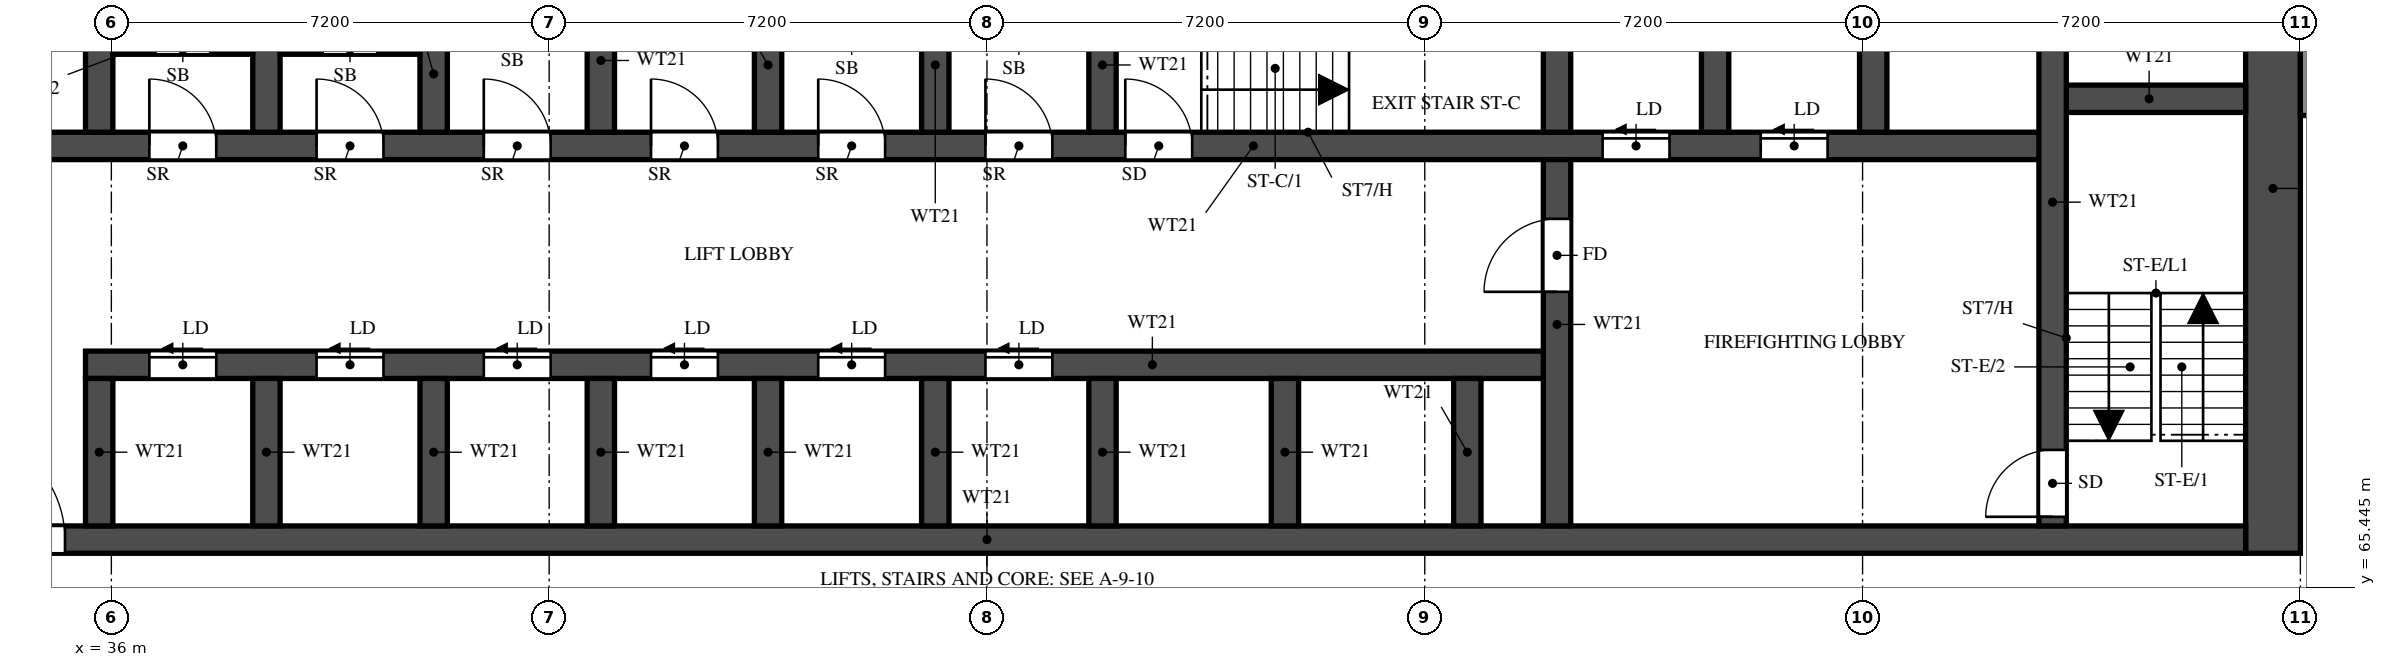
"""IFC4 building model, lengths in metres.
Left out: names, types, materials, properties, quantities, classifications, styles, units other than length and angle.
Written with IfcOpenShell. Run it as: python <this file> out.ifc"""

import sys

from ifc_helpers import new_model, si_unit, direction, frame, frame_2d, origin, place, context, subcontext, project, spatial, rectangle, extrude, element, fill, save


model = new_model("IFC4")
c1 = context("Model", 3, precision=1e-05, world=origin(), true_north=direction((0.0, 1.0)))
c2 = subcontext(c1, "Body", "Model", "MODEL_VIEW")
j1 = project(units=[si_unit("LENGTHUNIT", "METRE"), si_unit("PLANEANGLEUNIT", "RADIAN")], contexts=[c1])
p1 = place(None, origin())
s1 = spatial("IfcSite", under=j1, at=p1, CompositionType="ELEMENT")
p2 = place(p1, origin())
s2 = spatial("IfcBuilding", under=s1, at=p2, CompositionType="ELEMENT")
p3 = place(p2, frame((0.0, 0.0, 51.5)))
s3 = spatial("IfcBuildingStorey", under=s2, at=p3, CompositionType="ELEMENT", Elevation=51.5)
p4 = place(p3, frame((71.55, 66.0, 0.0), z_axis=(0.0, 0.0, 1.0), x_axis=(0.0, 1.0, 0.0)))
e1 = element("IfcWall", 1, at=p4, inside=s3, PredefinedType="SHEAR", context=c2, shape_type="SweptSolid", body=[
    extrude(rectangle(XDim=12.0, YDim=0.9, at=frame_2d((6.0, 0.0))), origin(), (0.0, 0.0, 1.0), 3.18),
])
p5 = place(p3, frame((29.7, 66.225, 0.0), z_axis=(0.0, 0.0, 1.0), x_axis=(1.0, 0.0, 0.0)))
e2 = element("IfcWall", 2, at=p5, inside=s3, PredefinedType="SHEAR", context=c2, shape_type="SweptSolid", body=[
    extrude(rectangle(XDim=41.4, YDim=0.45, at=frame_2d((20.7, 0.0))), origin(), (0.0, 0.0, 1.0), 3.18),
])
p6 = place(p5, frame((0.925, 0.0, 0.0)))
e3 = element("IfcOpeningElement", 3, at=p6, cuts=e2, PredefinedType="OPENING", context=c2, shape_type="SweptSolid", body=[
    extrude(rectangle(XDim=1.1, YDim=2.1, at=frame_2d((0.55, 1.05))), frame((0.0, 0.235, 0.0), z_axis=(0.0, -1.0, 0.0), x_axis=(1.0, 0.0, 0.0)), (0.0, 0.0, 1.0), 0.47),
])
p7 = place(p5, frame((3.738, 0.0, 0.0)))
e4 = element("IfcOpeningElement", 4, at=p7, cuts=e2, PredefinedType="OPENING", context=c2, shape_type="SweptSolid", body=[
    extrude(rectangle(XDim=1.8, YDim=2.1, at=frame_2d((0.9, 1.05))), frame((0.0, 0.235, 0.0), z_axis=(0.0, -1.0, 0.0), x_axis=(1.0, 0.0, 0.0)), (0.0, 0.0, 1.0), 0.47),
])
p8 = place(p3, frame((35.575, 69.1, 0.0), z_axis=(0.0, 0.0, 1.0), x_axis=(1.0, 0.0, 0.0)))
e5 = element("IfcWall", 5, at=p8, inside=s3, PredefinedType="SHEAR", context=c2, shape_type="SweptSolid", body=[
    extrude(rectangle(XDim=24.2, YDim=0.45, at=frame_2d((12.1, 0.0))), origin(), (0.0, 0.0, 1.0), 3.18),
])
p9 = place(p8, frame((1.05, 0.0, 0.0)))
e6 = element("IfcOpeningElement", 6, at=p9, cuts=e5, PredefinedType="OPENING", context=c2, shape_type="SweptSolid", body=[
    extrude(rectangle(XDim=1.1, YDim=2.1, at=frame_2d((0.55, 1.05))), frame((0.0, 0.235, 0.0), z_axis=(0.0, -1.0, 0.0), x_axis=(1.0, 0.0, 0.0)), (0.0, 0.0, 1.0), 0.47),
])
p10 = place(p8, frame((3.8, 0.0, 0.0)))
e7 = element("IfcOpeningElement", 7, at=p10, cuts=e5, PredefinedType="OPENING", context=c2, shape_type="SweptSolid", body=[
    extrude(rectangle(XDim=1.1, YDim=2.1, at=frame_2d((0.55, 1.05))), frame((0.0, 0.235, 0.0), z_axis=(0.0, -1.0, 0.0), x_axis=(1.0, 0.0, 0.0)), (0.0, 0.0, 1.0), 0.47),
])
p11 = place(p8, frame((6.55, 0.0, 0.0)))
e8 = element("IfcOpeningElement", 8, at=p11, cuts=e5, PredefinedType="OPENING", context=c2, shape_type="SweptSolid", body=[
    extrude(rectangle(XDim=1.1, YDim=2.1, at=frame_2d((0.55, 1.05))), frame((0.0, 0.235, 0.0), z_axis=(0.0, -1.0, 0.0), x_axis=(1.0, 0.0, 0.0)), (0.0, 0.0, 1.0), 0.47),
])
p12 = place(p8, frame((9.3, 0.0, 0.0)))
e9 = element("IfcOpeningElement", 9, at=p12, cuts=e5, PredefinedType="OPENING", context=c2, shape_type="SweptSolid", body=[
    extrude(rectangle(XDim=1.1, YDim=2.1, at=frame_2d((0.55, 1.05))), frame((0.0, 0.235, 0.0), z_axis=(0.0, -1.0, 0.0), x_axis=(1.0, 0.0, 0.0)), (0.0, 0.0, 1.0), 0.47),
])
p13 = place(p8, frame((12.05, 0.0, 0.0)))
e10 = element("IfcOpeningElement", 10, at=p13, cuts=e5, PredefinedType="OPENING", context=c2, shape_type="SweptSolid", body=[
    extrude(rectangle(XDim=1.1, YDim=2.1, at=frame_2d((0.55, 1.05))), frame((0.0, 0.235, 0.0), z_axis=(0.0, -1.0, 0.0), x_axis=(1.0, 0.0, 0.0)), (0.0, 0.0, 1.0), 0.47),
])
p14 = place(p8, frame((14.8, 0.0, 0.0)))
e11 = element("IfcOpeningElement", 11, at=p14, cuts=e5, PredefinedType="OPENING", context=c2, shape_type="SweptSolid", body=[
    extrude(rectangle(XDim=1.1, YDim=2.1, at=frame_2d((0.55, 1.05))), frame((0.0, 0.235, 0.0), z_axis=(0.0, -1.0, 0.0), x_axis=(1.0, 0.0, 0.0)), (0.0, 0.0, 1.0), 0.47),
])
p15 = place(p3, frame((32.875, 72.7, 0.0), z_axis=(0.0, 0.0, 1.0), x_axis=(1.0, 0.0, 0.0)))
e12 = element("IfcWall", 12, at=p15, inside=s3, PredefinedType="SHEAR", context=c2, shape_type="SweptSolid", body=[
    extrude(rectangle(XDim=35.05, YDim=0.45, at=frame_2d((17.525, 0.0))), origin(), (0.0, 0.0, 1.0), 3.18),
])
p16 = place(p15, frame((19.8, 0.0, 0.0)))
e13 = element("IfcOpeningElement", 13, at=p16, cuts=e12, PredefinedType="OPENING", context=c2, shape_type="SweptSolid", body=[
    extrude(rectangle(XDim=1.1, YDim=2.1, at=frame_2d((0.55, 1.05))), frame((0.0, 0.235, 0.0), z_axis=(0.0, -1.0, 0.0), x_axis=(1.0, 0.0, 0.0)), (0.0, 0.0, 1.0), 0.47),
])
p17 = place(p15, frame((27.65, 0.0, 0.0)))
e14 = element("IfcOpeningElement", 14, at=p17, cuts=e12, PredefinedType="OPENING", context=c2, shape_type="SweptSolid", body=[
    extrude(rectangle(XDim=1.1, YDim=2.1, at=frame_2d((0.55, 1.05))), frame((0.0, 0.235, 0.0), z_axis=(0.0, -1.0, 0.0), x_axis=(1.0, 0.0, 0.0)), (0.0, 0.0, 1.0), 0.47),
])
p18 = place(p15, frame((30.25, 0.0, 0.0)))
e15 = element("IfcOpeningElement", 15, at=p18, cuts=e12, PredefinedType="OPENING", context=c2, shape_type="SweptSolid", body=[
    extrude(rectangle(XDim=1.1, YDim=2.1, at=frame_2d((0.55, 1.05))), frame((0.0, 0.235, 0.0), z_axis=(0.0, -1.0, 0.0), x_axis=(1.0, 0.0, 0.0)), (0.0, 0.0, 1.0), 0.47),
])
p19 = place(p15, frame((3.75, 0.0, 0.0)))
e16 = element("IfcOpeningElement", 16, at=p19, cuts=e12, PredefinedType="OPENING", context=c2, shape_type="SweptSolid", body=[
    extrude(rectangle(XDim=1.1, YDim=2.1, at=frame_2d((0.55, 1.05))), frame((0.0, 0.235, 0.0), z_axis=(0.0, -1.0, 0.0), x_axis=(1.0, 0.0, 0.0)), (0.0, 0.0, 1.0), 0.47),
])
p20 = place(p15, frame((6.5, 0.0, 0.0)))
e17 = element("IfcOpeningElement", 17, at=p20, cuts=e12, PredefinedType="OPENING", context=c2, shape_type="SweptSolid", body=[
    extrude(rectangle(XDim=1.1, YDim=2.1, at=frame_2d((0.55, 1.05))), frame((0.0, 0.235, 0.0), z_axis=(0.0, -1.0, 0.0), x_axis=(1.0, 0.0, 0.0)), (0.0, 0.0, 1.0), 0.47),
])
p21 = place(p15, frame((9.25, 0.0, 0.0)))
e18 = element("IfcOpeningElement", 18, at=p21, cuts=e12, PredefinedType="OPENING", context=c2, shape_type="SweptSolid", body=[
    extrude(rectangle(XDim=1.1, YDim=2.1, at=frame_2d((0.55, 1.05))), frame((0.0, 0.235, 0.0), z_axis=(0.0, -1.0, 0.0), x_axis=(1.0, 0.0, 0.0)), (0.0, 0.0, 1.0), 0.47),
])
p22 = place(p15, frame((12.0, 0.0, 0.0)))
e19 = element("IfcOpeningElement", 19, at=p22, cuts=e12, PredefinedType="OPENING", context=c2, shape_type="SweptSolid", body=[
    extrude(rectangle(XDim=1.1, YDim=2.1, at=frame_2d((0.55, 1.05))), frame((0.0, 0.235, 0.0), z_axis=(0.0, -1.0, 0.0), x_axis=(1.0, 0.0, 0.0)), (0.0, 0.0, 1.0), 0.47),
])
p23 = place(p15, frame((14.75, 0.0, 0.0)))
e20 = element("IfcOpeningElement", 20, at=p23, cuts=e12, PredefinedType="OPENING", context=c2, shape_type="SweptSolid", body=[
    extrude(rectangle(XDim=1.1, YDim=2.1, at=frame_2d((0.55, 1.05))), frame((0.0, 0.235, 0.0), z_axis=(0.0, -1.0, 0.0), x_axis=(1.0, 0.0, 0.0)), (0.0, 0.0, 1.0), 0.47),
])
p24 = place(p15, frame((17.5, 0.0, 0.0)))
e21 = element("IfcOpeningElement", 21, at=p24, cuts=e12, PredefinedType="OPENING", context=c2, shape_type="SweptSolid", body=[
    extrude(rectangle(XDim=1.1, YDim=2.1, at=frame_2d((0.55, 1.05))), frame((0.0, 0.235, 0.0), z_axis=(0.0, -1.0, 0.0), x_axis=(1.0, 0.0, 0.0)), (0.0, 0.0, 1.0), 0.47),
])
p25 = place(p15, frame((0.913, 0.0, 0.0)))
e22 = element("IfcOpeningElement", 22, at=p25, cuts=e12, PredefinedType="OPENING", context=c2, shape_type="SweptSolid", body=[
    extrude(rectangle(XDim=1.1, YDim=2.1, at=frame_2d((0.55, 1.05))), frame((0.0, 0.235, 0.0), z_axis=(0.0, -1.0, 0.0), x_axis=(1.0, 0.0, 0.0)), (0.0, 0.0, 1.0), 0.47),
])
p26 = place(p3, frame((67.925, 73.475, 0.0), z_axis=(0.0, 0.0, 1.0), x_axis=(1.0, 0.0, 0.0)))
e23 = element("IfcWall", 23, at=p26, inside=s3, PredefinedType="SHEAR", context=c2, shape_type="SweptSolid", body=[
    extrude(rectangle(XDim=3.175, YDim=0.45, at=frame_2d((1.587, 0.0))), origin(), (0.0, 0.0, 1.0), 3.18),
])
p27 = place(p3, frame((67.925, 66.45, 0.0), z_axis=(0.0, 0.0, 1.0), x_axis=(0.0, 1.0, 0.0)))
e24 = element("IfcWall", 24, at=p27, inside=s3, PredefinedType="SHEAR", context=c2, shape_type="SweptSolid", body=[
    extrude(rectangle(XDim=10.65, YDim=0.45, at=frame_2d((5.325, 0.0))), origin(), (0.0, 0.0, 1.0), 3.18),
])
p28 = place(p27, frame((0.15, 0.0, 0.0)))
e25 = element("IfcOpeningElement", 25, at=p28, cuts=e24, PredefinedType="OPENING", context=c2, shape_type="SweptSolid", body=[
    extrude(rectangle(XDim=1.1, YDim=2.1, at=frame_2d((0.55, 1.05))), frame((0.0, 0.235, 0.0), z_axis=(0.0, -1.0, 0.0), x_axis=(1.0, 0.0, 0.0)), (0.0, 0.0, 1.0), 0.47),
])
p29 = place(p3, frame((59.775, 66.45, 0.0), z_axis=(0.0, 0.0, 1.0), x_axis=(0.0, 1.0, 0.0)))
e26 = element("IfcWall", 26, at=p29, inside=s3, PredefinedType="SHEAR", context=c2, shape_type="SweptSolid", body=[
    extrude(rectangle(XDim=6.025, YDim=0.45, at=frame_2d((3.013, 0.0))), origin(), (0.0, 0.0, 1.0), 3.18),
])
p30 = place(p29, frame((3.85, 0.0, 0.0)))
e27 = element("IfcOpeningElement", 27, at=p30, cuts=e26, PredefinedType="OPENING", context=c2, shape_type="SweptSolid", body=[
    extrude(rectangle(XDim=1.2, YDim=2.1, at=frame_2d((0.6, 1.05))), frame((0.0, 0.235, 0.0), z_axis=(0.0, -1.0, 0.0), x_axis=(1.0, 0.0, 0.0)), (0.0, 0.0, 1.0), 0.47),
])
p31 = place(p3, frame((59.775, 72.925, 0.0), z_axis=(0.0, 0.0, 1.0), x_axis=(0.0, 1.0, 0.0)))
e28 = element("IfcWall", 28, at=p31, inside=s3, PredefinedType="SHEAR", context=c2, shape_type="SweptSolid", body=[
    extrude(rectangle(XDim=2.95, YDim=0.45, at=frame_2d((1.475, 0.0))), origin(), (0.0, 0.0, 1.0), 3.18),
])
for number, where, z_axis, x_axis in (
    (29, (35.8, 66.45, 0.0), (0.0, 0.0, 1.0), (0.0, 1.0, 0.0)),
    (30, (38.55, 66.45, 0.0), (0.0, 0.0, 1.0), (0.0, 1.0, 0.0)),
    (31, (41.3, 66.45, 0.0), (0.0, 0.0, 1.0), (0.0, 1.0, 0.0)),
    (32, (44.05, 66.45, 0.0), (0.0, 0.0, 1.0), (0.0, 1.0, 0.0)),
    (33, (46.8, 66.45, 0.0), (0.0, 0.0, 1.0), (0.0, 1.0, 0.0)),
    (34, (49.55, 66.45, 0.0), (0.0, 0.0, 1.0), (0.0, 1.0, 0.0)),
    (35, (52.3, 66.45, 0.0), (0.0, 0.0, 1.0), (0.0, 1.0, 0.0)),
    (36, (55.3, 66.45, 0.0), (0.0, 0.0, 1.0), (0.0, 1.0, 0.0)),
    (37, (58.3, 66.45, 0.0), (0.0, 0.0, 1.0), (0.0, 1.0, 0.0)),
):
    element("IfcWall", number, at=place(p3, frame(where, z_axis=z_axis, x_axis=x_axis)), inside=s3, PredefinedType="SHEAR", context=c2, shape_type="SweptSolid", body=[
        extrude(rectangle(XDim=2.425, YDim=0.45, at=frame_2d((1.212, 0.0))), origin(), (0.0, 0.0, 1.0), 3.18),
    ])
for number, where, z_axis, x_axis in (
    (38, (35.8, 72.925, 0.0), (0.0, 0.0, 1.0), (0.0, 1.0, 0.0)),
    (39, (38.55, 72.925, 0.0), (0.0, 0.0, 1.0), (0.0, 1.0, 0.0)),
    (40, (41.3, 72.925, 0.0), (0.0, 0.0, 1.0), (0.0, 1.0, 0.0)),
    (41, (44.05, 72.925, 0.0), (0.0, 0.0, 1.0), (0.0, 1.0, 0.0)),
    (42, (46.8, 72.925, 0.0), (0.0, 0.0, 1.0), (0.0, 1.0, 0.0)),
    (43, (49.55, 72.925, 0.0), (0.0, 0.0, 1.0), (0.0, 1.0, 0.0)),
    (44, (52.3, 72.925, 0.0), (0.0, 0.0, 1.0), (0.0, 1.0, 0.0)),
    (45, (62.375, 72.925, 0.0), (0.0, 0.0, 1.0), (0.0, 1.0, 0.0)),
    (46, (64.975, 72.925, 0.0), (0.0, 0.0, 1.0), (0.0, 1.0, 0.0)),
):
    element("IfcWall", number, at=place(p3, frame(where, z_axis=z_axis, x_axis=x_axis)), inside=s3, PredefinedType="SHEAR", context=c2, shape_type="SweptSolid", body=[
        extrude(rectangle(XDim=2.95, YDim=0.45, at=frame_2d((1.475, 0.0))), origin(), (0.0, 0.0, 1.0), 3.18),
    ])
p32 = place(p3, frame((36.025, 74.282, 0.0), z_axis=(0.0, 0.0, 1.0), x_axis=(1.0, 0.0, 0.0)))
e47 = element("IfcWall", 47, at=p32, inside=s3, PredefinedType="PARTITIONING", context=c2, shape_type="SweptSolid", body=[
    extrude(rectangle(XDim=2.3, YDim=0.15, at=frame_2d((1.15, 0.0))), origin(), (0.0, 0.0, 1.0), 3.18),
])
p33 = place(p32, frame((0.7, 0.0, 0.0)))
e48 = element("IfcOpeningElement", 48, at=p33, cuts=e47, PredefinedType="OPENING", context=c2, shape_type="SweptSolid", body=[
    extrude(rectangle(XDim=0.9, YDim=2.1, at=frame_2d((0.45, 1.05))), frame((0.0, 0.085, 0.0), z_axis=(0.0, -1.0, 0.0), x_axis=(1.0, 0.0, 0.0)), (0.0, 0.0, 1.0), 0.17),
])
p34 = place(p3, frame((38.775, 74.282, 0.0), z_axis=(0.0, 0.0, 1.0), x_axis=(1.0, 0.0, 0.0)))
e49 = element("IfcWall", 49, at=p34, inside=s3, PredefinedType="PARTITIONING", context=c2, shape_type="SweptSolid", body=[
    extrude(rectangle(XDim=2.3, YDim=0.15, at=frame_2d((1.15, 0.0))), origin(), (0.0, 0.0, 1.0), 3.18),
])
p35 = place(p34, frame((0.7, 0.0, 0.0)))
e50 = element("IfcOpeningElement", 50, at=p35, cuts=e49, PredefinedType="OPENING", context=c2, shape_type="SweptSolid", body=[
    extrude(rectangle(XDim=0.9, YDim=2.1, at=frame_2d((0.45, 1.05))), frame((0.0, 0.085, 0.0), z_axis=(0.0, -1.0, 0.0), x_axis=(1.0, 0.0, 0.0)), (0.0, 0.0, 1.0), 0.17),
])
p36 = place(p3, frame((72.1, 73.2, 0.0), z_axis=(0.0, 0.0, 1.0), x_axis=(0.0, 1.0, 0.0)))
e51 = element("IfcWall", 51, at=p36, inside=s3, PredefinedType="SOLIDWALL", context=c2, shape_type="SweptSolid", body=[
    extrude(rectangle(XDim=4.8, YDim=0.2, at=frame_2d((2.4, 0.0))), origin(), (0.0, 0.0, 1.0), 3.18),
])
p37 = place(p16, origin())
e52 = element("IfcDoor", 52, at=p37, inside=s3, OperationType="SINGLE_SWING_LEFT", PredefinedType="DOOR", context=c2, shape_type="SweptSolid", body=[
    extrude(rectangle(XDim=1.1, YDim=2.1, at=frame_2d((0.55, 1.05))), frame((0.0, 0.025, 0.0), z_axis=(0.0, -1.0, 0.0), x_axis=(1.0, 0.0, 0.0)), (0.0, 0.0, 1.0), 0.05),
])
fill(e13, e52)
p38 = place(p28, origin())
e53 = element("IfcDoor", 53, at=p38, inside=s3, OperationType="SINGLE_SWING_LEFT", PredefinedType="DOOR", context=c2, shape_type="SweptSolid", body=[
    extrude(rectangle(XDim=1.1, YDim=2.1, at=frame_2d((0.55, 1.05))), frame((0.0, 0.025, 0.0), z_axis=(0.0, -1.0, 0.0), x_axis=(1.0, 0.0, 0.0)), (0.0, 0.0, 1.0), 0.05),
])
fill(e25, e53)
p39 = place(p7, origin())
e54 = element("IfcDoor", 54, at=p39, inside=s3, OperationType="DOUBLE_DOOR_SINGLE_SWING", PredefinedType="DOOR", context=c2, shape_type="SweptSolid", body=[
    extrude(rectangle(XDim=1.8, YDim=2.1, at=frame_2d((0.9, 1.05))), frame((0.0, 0.025, 0.0), z_axis=(0.0, -1.0, 0.0), x_axis=(1.0, 0.0, 0.0)), (0.0, 0.0, 1.0), 0.05),
])
fill(e4, e54)
p40 = place(p30, origin())
e55 = element("IfcDoor", 55, at=p40, inside=s3, OperationType="SINGLE_SWING_RIGHT", PredefinedType="DOOR", context=c2, shape_type="SweptSolid", body=[
    extrude(rectangle(XDim=1.2, YDim=2.1, at=frame_2d((0.6, 1.05))), frame((0.0, 0.025, 0.0), z_axis=(0.0, -1.0, 0.0), x_axis=(1.0, 0.0, 0.0)), (0.0, 0.0, 1.0), 0.05),
])
fill(e27, e55)
p41 = place(p17, origin())
e56 = element("IfcDoor", 56, at=p41, inside=s3, OperationType="SLIDING_TO_LEFT", PredefinedType="DOOR", context=c2, shape_type="SweptSolid", body=[
    extrude(rectangle(XDim=1.1, YDim=2.1, at=frame_2d((0.55, 1.05))), frame((0.0, 0.025, 0.0), z_axis=(0.0, -1.0, 0.0), x_axis=(1.0, 0.0, 0.0)), (0.0, 0.0, 1.0), 0.05),
])
fill(e14, e56)
p42 = place(p18, origin())
e57 = element("IfcDoor", 57, at=p42, inside=s3, OperationType="SLIDING_TO_LEFT", PredefinedType="DOOR", context=c2, shape_type="SweptSolid", body=[
    extrude(rectangle(XDim=1.1, YDim=2.1, at=frame_2d((0.55, 1.05))), frame((0.0, 0.025, 0.0), z_axis=(0.0, -1.0, 0.0), x_axis=(1.0, 0.0, 0.0)), (0.0, 0.0, 1.0), 0.05),
])
fill(e15, e57)
p43 = place(p9, origin())
e58 = element("IfcDoor", 58, at=p43, inside=s3, OperationType="SLIDING_TO_LEFT", PredefinedType="DOOR", context=c2, shape_type="SweptSolid", body=[
    extrude(rectangle(XDim=1.1, YDim=2.1, at=frame_2d((0.55, 1.05))), frame((0.0, 0.025, 0.0), z_axis=(0.0, -1.0, 0.0), x_axis=(1.0, 0.0, 0.0)), (0.0, 0.0, 1.0), 0.05),
])
fill(e6, e58)
p44 = place(p10, origin())
e59 = element("IfcDoor", 59, at=p44, inside=s3, OperationType="SLIDING_TO_LEFT", PredefinedType="DOOR", context=c2, shape_type="SweptSolid", body=[
    extrude(rectangle(XDim=1.1, YDim=2.1, at=frame_2d((0.55, 1.05))), frame((0.0, 0.025, 0.0), z_axis=(0.0, -1.0, 0.0), x_axis=(1.0, 0.0, 0.0)), (0.0, 0.0, 1.0), 0.05),
])
fill(e7, e59)
p45 = place(p11, origin())
e60 = element("IfcDoor", 60, at=p45, inside=s3, OperationType="SLIDING_TO_LEFT", PredefinedType="DOOR", context=c2, shape_type="SweptSolid", body=[
    extrude(rectangle(XDim=1.1, YDim=2.1, at=frame_2d((0.55, 1.05))), frame((0.0, 0.025, 0.0), z_axis=(0.0, -1.0, 0.0), x_axis=(1.0, 0.0, 0.0)), (0.0, 0.0, 1.0), 0.05),
])
fill(e8, e60)
p46 = place(p12, origin())
e61 = element("IfcDoor", 61, at=p46, inside=s3, OperationType="SLIDING_TO_LEFT", PredefinedType="DOOR", context=c2, shape_type="SweptSolid", body=[
    extrude(rectangle(XDim=1.1, YDim=2.1, at=frame_2d((0.55, 1.05))), frame((0.0, 0.025, 0.0), z_axis=(0.0, -1.0, 0.0), x_axis=(1.0, 0.0, 0.0)), (0.0, 0.0, 1.0), 0.05),
])
fill(e9, e61)
p47 = place(p13, origin())
e62 = element("IfcDoor", 62, at=p47, inside=s3, OperationType="SLIDING_TO_LEFT", PredefinedType="DOOR", context=c2, shape_type="SweptSolid", body=[
    extrude(rectangle(XDim=1.1, YDim=2.1, at=frame_2d((0.55, 1.05))), frame((0.0, 0.025, 0.0), z_axis=(0.0, -1.0, 0.0), x_axis=(1.0, 0.0, 0.0)), (0.0, 0.0, 1.0), 0.05),
])
fill(e10, e62)
p48 = place(p14, origin())
e63 = element("IfcDoor", 63, at=p48, inside=s3, OperationType="SLIDING_TO_LEFT", PredefinedType="DOOR", context=c2, shape_type="SweptSolid", body=[
    extrude(rectangle(XDim=1.1, YDim=2.1, at=frame_2d((0.55, 1.05))), frame((0.0, 0.025, 0.0), z_axis=(0.0, -1.0, 0.0), x_axis=(1.0, 0.0, 0.0)), (0.0, 0.0, 1.0), 0.05),
])
fill(e11, e63)
p49 = place(p19, origin())
e64 = element("IfcDoor", 64, at=p49, inside=s3, OperationType="SINGLE_SWING_LEFT", PredefinedType="DOOR", context=c2, shape_type="SweptSolid", body=[
    extrude(rectangle(XDim=1.1, YDim=2.1, at=frame_2d((0.55, 1.05))), frame((0.0, 0.025, 0.0), z_axis=(0.0, -1.0, 0.0), x_axis=(1.0, 0.0, 0.0)), (0.0, 0.0, 1.0), 0.05),
])
fill(e16, e64)
p50 = place(p20, origin())
e65 = element("IfcDoor", 65, at=p50, inside=s3, OperationType="SINGLE_SWING_LEFT", PredefinedType="DOOR", context=c2, shape_type="SweptSolid", body=[
    extrude(rectangle(XDim=1.1, YDim=2.1, at=frame_2d((0.55, 1.05))), frame((0.0, 0.025, 0.0), z_axis=(0.0, -1.0, 0.0), x_axis=(1.0, 0.0, 0.0)), (0.0, 0.0, 1.0), 0.05),
])
fill(e17, e65)
p51 = place(p21, origin())
e66 = element("IfcDoor", 66, at=p51, inside=s3, OperationType="SINGLE_SWING_LEFT", PredefinedType="DOOR", context=c2, shape_type="SweptSolid", body=[
    extrude(rectangle(XDim=1.1, YDim=2.1, at=frame_2d((0.55, 1.05))), frame((0.0, 0.025, 0.0), z_axis=(0.0, -1.0, 0.0), x_axis=(1.0, 0.0, 0.0)), (0.0, 0.0, 1.0), 0.05),
])
fill(e18, e66)
p52 = place(p22, origin())
e67 = element("IfcDoor", 67, at=p52, inside=s3, OperationType="SINGLE_SWING_LEFT", PredefinedType="DOOR", context=c2, shape_type="SweptSolid", body=[
    extrude(rectangle(XDim=1.1, YDim=2.1, at=frame_2d((0.55, 1.05))), frame((0.0, 0.025, 0.0), z_axis=(0.0, -1.0, 0.0), x_axis=(1.0, 0.0, 0.0)), (0.0, 0.0, 1.0), 0.05),
])
fill(e19, e67)
p53 = place(p23, origin())
e68 = element("IfcDoor", 68, at=p53, inside=s3, OperationType="SINGLE_SWING_LEFT", PredefinedType="DOOR", context=c2, shape_type="SweptSolid", body=[
    extrude(rectangle(XDim=1.1, YDim=2.1, at=frame_2d((0.55, 1.05))), frame((0.0, 0.025, 0.0), z_axis=(0.0, -1.0, 0.0), x_axis=(1.0, 0.0, 0.0)), (0.0, 0.0, 1.0), 0.05),
])
fill(e20, e68)
p54 = place(p24, origin())
e69 = element("IfcDoor", 69, at=p54, inside=s3, OperationType="SINGLE_SWING_LEFT", PredefinedType="DOOR", context=c2, shape_type="SweptSolid", body=[
    extrude(rectangle(XDim=1.1, YDim=2.1, at=frame_2d((0.55, 1.05))), frame((0.0, 0.025, 0.0), z_axis=(0.0, -1.0, 0.0), x_axis=(1.0, 0.0, 0.0)), (0.0, 0.0, 1.0), 0.05),
])
fill(e21, e69)
save(model, sys.argv[1])
